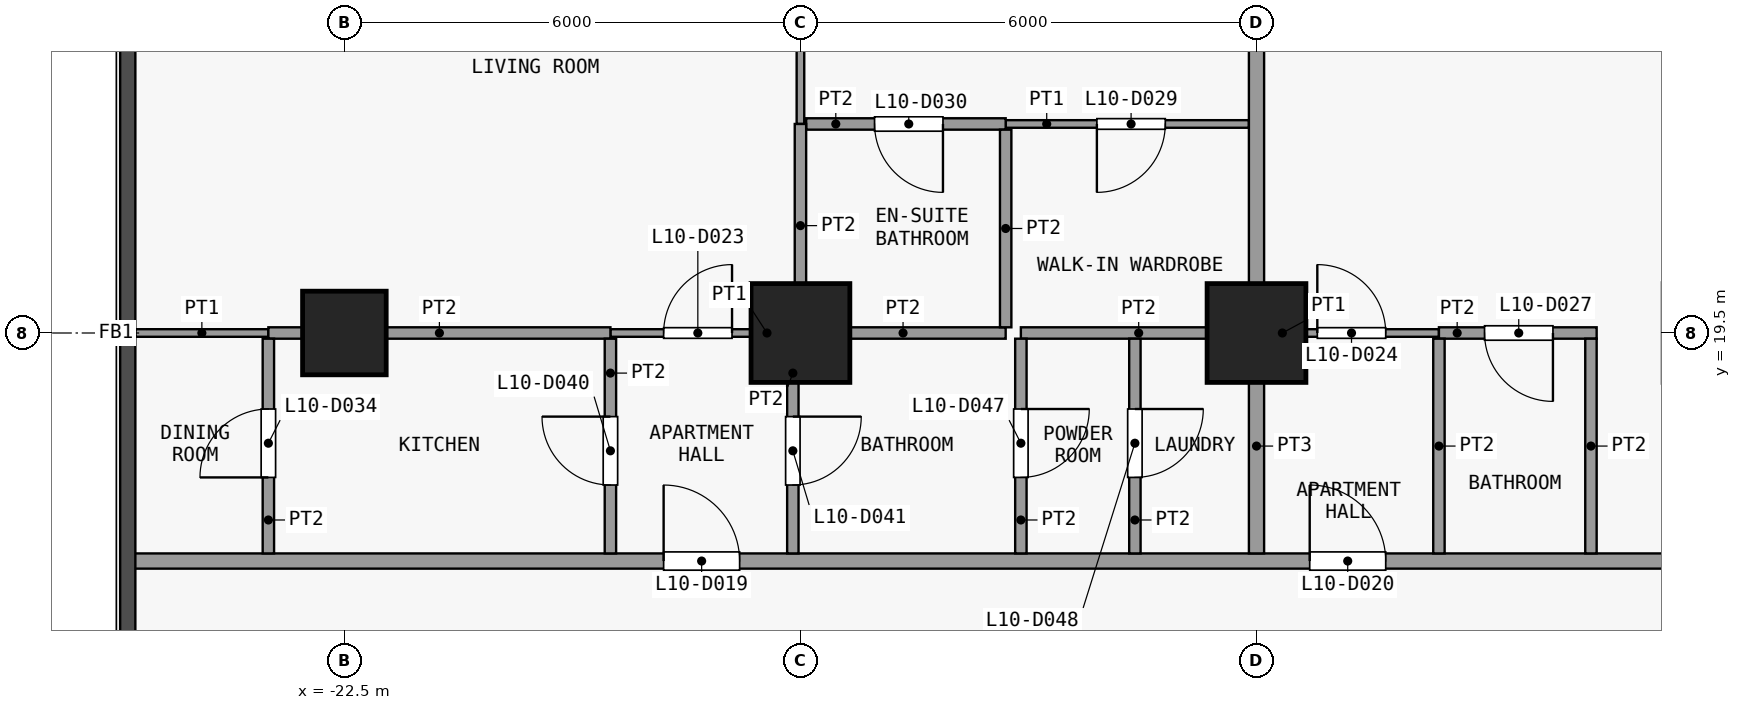
"""IFC4 building model, lengths in metres.
Left out: names, types, materials, properties, quantities, classifications, styles, units other than length and angle.
Written with IfcOpenShell. Run it as: python <this file> out.ifc"""

import sys

from ifc_helpers import new_model, si_unit, direction, frame, frame_2d, origin, origin_2d, place, context, subcontext, project, spatial, rectangle, extrude, element, fill, save


model = new_model("IFC4")
c1 = context("Model", 3, precision=1e-05, world=origin(), true_north=direction((0.0, 1.0)))
c2 = subcontext(c1, "Body", "Model", "MODEL_VIEW")
j1 = project(units=[si_unit("LENGTHUNIT", "METRE"), si_unit("PLANEANGLEUNIT", "RADIAN")], contexts=[c1])
p1 = place(None, origin())
s1 = spatial("IfcSite", under=j1, at=p1, CompositionType="ELEMENT")
p2 = place(p1, origin())
s2 = spatial("IfcBuilding", under=s1, at=p2, CompositionType="ELEMENT")
p3 = place(p2, frame((0.0, 0.0, 46.9)))
s3 = spatial("IfcBuildingStorey", under=s2, at=p3, CompositionType="ELEMENT", Elevation=46.9)
p4 = place(p3, frame((-22.5, 19.5, 0.0), z_axis=(0.0, 0.0, 1.0), x_axis=(1.0, 0.0, 0.0)))
e1 = element("IfcColumn", 1, at=p4, inside=s3, PredefinedType="COLUMN", context=c2, shape_type="SweptSolid", body=[
    extrude(rectangle(XDim=1.1, YDim=1.1, at=origin_2d()), origin(), (0.0, 0.0, 1.0), 3.6),
])
for number, where, z_axis, x_axis in (
    (2, (-16.5, 19.5, 0.0), (0.0, 0.0, 1.0), (1.0, 0.0, 0.0)),
    (3, (-10.5, 19.5, 0.0), (0.0, 0.0, 1.0), (1.0, 0.0, 0.0)),
):
    element("IfcColumn", number, at=place(p3, frame(where, z_axis=z_axis, x_axis=x_axis)), inside=s3, PredefinedType="COLUMN", context=c2, shape_type="SweptSolid", body=[
        extrude(rectangle(XDim=1.3, YDim=1.3, at=origin_2d()), origin(), (0.0, 0.0, 1.0), 3.6),
    ])
p5 = place(p3, frame((-25.35, 16.5, 0.0), z_axis=(0.0, 0.0, 1.0), x_axis=(1.0, 0.0, 0.0)))
e4 = element("IfcWall", 4, at=p5, inside=s3, PredefinedType="PARTITIONING", context=c2, shape_type="SweptSolid", body=[
    extrude(rectangle(XDim=50.7, YDim=0.2, at=frame_2d((25.35, 0.0))), origin(), (0.0, 0.0, 1.0), 3.3),
])
p6 = place(p5, frame((7.05, 0.0, 0.0)))
e5 = element("IfcOpeningElement", 5, at=p6, cuts=e4, PredefinedType="OPENING", context=c2, shape_type="SweptSolid", body=[
    extrude(rectangle(XDim=1.0, YDim=2.1, at=frame_2d((0.5, 1.05))), frame((0.0, 0.11, 0.0), z_axis=(0.0, -1.0, 0.0), x_axis=(1.0, 0.0, 0.0)), (0.0, 0.0, 1.0), 0.22),
])
p7 = place(p5, frame((15.55, 0.0, 0.0)))
e6 = element("IfcOpeningElement", 6, at=p7, cuts=e4, PredefinedType="OPENING", context=c2, shape_type="SweptSolid", body=[
    extrude(rectangle(XDim=1.0, YDim=2.1, at=frame_2d((0.5, 1.05))), frame((0.0, 0.11, 0.0), z_axis=(0.0, -1.0, 0.0), x_axis=(1.0, 0.0, 0.0)), (0.0, 0.0, 1.0), 0.22),
])
p8 = place(p5, frame((30.55, 0.0, 0.0)))
e7 = element("IfcOpeningElement", 7, at=p8, cuts=e4, PredefinedType="OPENING", context=c2, shape_type="SweptSolid", body=[
    extrude(rectangle(XDim=1.0, YDim=2.1, at=frame_2d((0.5, 1.05))), frame((0.0, 0.11, 0.0), z_axis=(0.0, -1.0, 0.0), x_axis=(1.0, 0.0, 0.0)), (0.0, 0.0, 1.0), 0.22),
])
p9 = place(p5, frame((45.05, 0.0, 0.0)))
e8 = element("IfcOpeningElement", 8, at=p9, cuts=e4, PredefinedType="OPENING", context=c2, shape_type="SweptSolid", body=[
    extrude(rectangle(XDim=1.0, YDim=2.1, at=frame_2d((0.5, 1.05))), frame((0.0, 0.11, 0.0), z_axis=(0.0, -1.0, 0.0), x_axis=(1.0, 0.0, 0.0)), (0.0, 0.0, 1.0), 0.22),
])
p10 = place(p3, frame((-25.25, 19.5, 0.0), z_axis=(0.0, 0.0, 1.0), x_axis=(1.0, 0.0, 0.0)))
e9 = element("IfcWall", 9, at=p10, inside=s3, PredefinedType="PARTITIONING", context=c2, shape_type="SweptSolid", body=[
    extrude(rectangle(XDim=1.75, YDim=0.1, at=frame_2d((0.875, 0.0))), origin(), (0.0, 0.0, 1.0), 3.3),
])
p11 = place(p3, frame((-19.0, 19.5, 0.0), z_axis=(0.0, 0.0, 1.0), x_axis=(1.0, 0.0, 0.0)))
e10 = element("IfcWall", 10, at=p11, inside=s3, PredefinedType="PARTITIONING", context=c2, shape_type="SweptSolid", body=[
    extrude(rectangle(XDim=2.4, YDim=0.1, at=frame_2d((1.2, 0.0))), origin(), (0.0, 0.0, 1.0), 3.3),
])
p12 = place(p11, frame((0.7, 0.0, 0.0)))
e11 = element("IfcOpeningElement", 11, at=p12, cuts=e10, PredefinedType="OPENING", context=c2, shape_type="SweptSolid", body=[
    extrude(rectangle(XDim=0.9, YDim=2.1, at=frame_2d((0.45, 1.05))), frame((0.0, 0.06, 0.0), z_axis=(0.0, -1.0, 0.0), x_axis=(1.0, 0.0, 0.0)), (0.0, 0.0, 1.0), 0.12),
])
p13 = place(p3, frame((-10.5, 19.5, 0.0), z_axis=(0.0, 0.0, 1.0), x_axis=(1.0, 0.0, 0.0)))
e12 = element("IfcWall", 12, at=p13, inside=s3, PredefinedType="PARTITIONING", context=c2, shape_type="SweptSolid", body=[
    extrude(rectangle(XDim=2.4, YDim=0.1, at=frame_2d((1.2, 0.0))), origin(), (0.0, 0.0, 1.0), 3.3),
])
p14 = place(p13, frame((0.8, 0.0, 0.0)))
e13 = element("IfcOpeningElement", 13, at=p14, cuts=e12, PredefinedType="OPENING", context=c2, shape_type="SweptSolid", body=[
    extrude(rectangle(XDim=0.9, YDim=2.1, at=frame_2d((0.45, 1.05))), frame((0.0, 0.06, 0.0), z_axis=(0.0, -1.0, 0.0), x_axis=(1.0, 0.0, 0.0)), (0.0, 0.0, 1.0), 0.12),
])
p15 = place(p3, frame((-23.5, 19.5, 0.0), z_axis=(0.0, 0.0, 1.0), x_axis=(1.0, 0.0, 0.0)))
e14 = element("IfcWall", 14, at=p15, inside=s3, PredefinedType="PARTITIONING", context=c2, shape_type="SweptSolid", body=[
    extrude(rectangle(XDim=4.5, YDim=0.15, at=frame_2d((2.25, 0.0))), origin(), (0.0, 0.0, 1.0), 3.3),
])
p16 = place(p3, frame((-16.5, 19.5, 0.0), z_axis=(0.0, 0.0, 1.0), x_axis=(1.0, 0.0, 0.0)))
e15 = element("IfcWall", 15, at=p16, inside=s3, PredefinedType="PARTITIONING", context=c2, shape_type="SweptSolid", body=[
    extrude(rectangle(XDim=2.7, YDim=0.15, at=frame_2d((1.35, 0.0))), origin(), (0.0, 0.0, 1.0), 3.3),
])
p17 = place(p3, frame((-13.6, 19.5, 0.0), z_axis=(0.0, 0.0, 1.0), x_axis=(1.0, 0.0, 0.0)))
e16 = element("IfcWall", 16, at=p17, inside=s3, PredefinedType="PARTITIONING", context=c2, shape_type="SweptSolid", body=[
    extrude(rectangle(XDim=3.1, YDim=0.15, at=frame_2d((1.55, 0.0))), origin(), (0.0, 0.0, 1.0), 3.3),
])
p18 = place(p3, frame((-8.1, 19.5, 0.0), z_axis=(0.0, 0.0, 1.0), x_axis=(1.0, 0.0, 0.0)))
e17 = element("IfcWall", 17, at=p18, inside=s3, PredefinedType="PARTITIONING", context=c2, shape_type="SweptSolid", body=[
    extrude(rectangle(XDim=2.075, YDim=0.15, at=frame_2d((1.038, 0.0))), origin(), (0.0, 0.0, 1.0), 3.3),
])
p19 = place(p18, frame((0.6, 0.0, 0.0)))
e18 = element("IfcOpeningElement", 18, at=p19, cuts=e17, PredefinedType="OPENING", context=c2, shape_type="SweptSolid", body=[
    extrude(rectangle(XDim=0.9, YDim=2.1, at=frame_2d((0.45, 1.05))), frame((0.0, 0.085, 0.0), z_axis=(0.0, -1.0, 0.0), x_axis=(1.0, 0.0, 0.0)), (0.0, 0.0, 1.0), 0.17),
])
p20 = place(p3, frame((-13.8, 22.25, 0.0), z_axis=(0.0, 0.0, 1.0), x_axis=(1.0, 0.0, 0.0)))
e19 = element("IfcWall", 19, at=p20, inside=s3, PredefinedType="PARTITIONING", context=c2, shape_type="SweptSolid", body=[
    extrude(rectangle(XDim=3.2, YDim=0.1, at=frame_2d((1.6, 0.0))), origin(), (0.0, 0.0, 1.0), 3.3),
])
p21 = place(p20, frame((1.2, 0.0, 0.0)))
e20 = element("IfcOpeningElement", 20, at=p21, cuts=e19, PredefinedType="OPENING", context=c2, shape_type="SweptSolid", body=[
    extrude(rectangle(XDim=0.9, YDim=2.1, at=frame_2d((0.45, 1.05))), frame((0.0, 0.06, 0.0), z_axis=(0.0, -1.0, 0.0), x_axis=(1.0, 0.0, 0.0)), (0.0, 0.0, 1.0), 0.12),
])
p22 = place(p3, frame((-16.425, 22.25, 0.0), z_axis=(0.0, 0.0, 1.0), x_axis=(1.0, 0.0, 0.0)))
e21 = element("IfcWall", 21, at=p22, inside=s3, PredefinedType="PARTITIONING", context=c2, shape_type="SweptSolid", body=[
    extrude(rectangle(XDim=2.625, YDim=0.15, at=frame_2d((1.312, 0.0))), origin(), (0.0, 0.0, 1.0), 3.3),
])
p23 = place(p22, frame((0.9, 0.0, 0.0)))
e22 = element("IfcOpeningElement", 22, at=p23, cuts=e21, PredefinedType="OPENING", context=c2, shape_type="SweptSolid", body=[
    extrude(rectangle(XDim=0.9, YDim=2.1, at=frame_2d((0.45, 1.05))), frame((0.0, 0.085, 0.0), z_axis=(0.0, -1.0, 0.0), x_axis=(1.0, 0.0, 0.0)), (0.0, 0.0, 1.0), 0.17),
])
p24 = place(p3, frame((-23.5, 16.6, 0.0), z_axis=(0.0, 0.0, 1.0), x_axis=(0.0, 1.0, 0.0)))
e23 = element("IfcWall", 23, at=p24, inside=s3, PredefinedType="PARTITIONING", context=c2, shape_type="SweptSolid", body=[
    extrude(rectangle(XDim=2.825, YDim=0.15, at=frame_2d((1.413, 0.0))), origin(), (0.0, 0.0, 1.0), 3.3),
])
p25 = place(p24, frame((1.0, 0.0, 0.0)))
e24 = element("IfcOpeningElement", 24, at=p25, cuts=e23, PredefinedType="OPENING", context=c2, shape_type="SweptSolid", body=[
    extrude(rectangle(XDim=0.9, YDim=2.1, at=frame_2d((0.45, 1.05))), frame((0.0, 0.085, 0.0), z_axis=(0.0, -1.0, 0.0), x_axis=(1.0, 0.0, 0.0)), (0.0, 0.0, 1.0), 0.17),
])
p26 = place(p3, frame((-19.0, 16.6, 0.0), z_axis=(0.0, 0.0, 1.0), x_axis=(0.0, 1.0, 0.0)))
e25 = element("IfcWall", 25, at=p26, inside=s3, PredefinedType="PARTITIONING", context=c2, shape_type="SweptSolid", body=[
    extrude(rectangle(XDim=2.825, YDim=0.15, at=frame_2d((1.413, 0.0))), origin(), (0.0, 0.0, 1.0), 3.3),
])
p27 = place(p26, frame((0.9, 0.0, 0.0)))
e26 = element("IfcOpeningElement", 26, at=p27, cuts=e25, PredefinedType="OPENING", context=c2, shape_type="SweptSolid", body=[
    extrude(rectangle(XDim=0.9, YDim=2.1, at=frame_2d((0.45, 1.05))), frame((0.0, 0.085, 0.0), z_axis=(0.0, -1.0, 0.0), x_axis=(1.0, 0.0, 0.0)), (0.0, 0.0, 1.0), 0.17),
])
p28 = place(p3, frame((-16.6, 16.6, 0.0), z_axis=(0.0, 0.0, 1.0), x_axis=(0.0, 1.0, 0.0)))
e27 = element("IfcWall", 27, at=p28, inside=s3, PredefinedType="PARTITIONING", context=c2, shape_type="SweptSolid", body=[
    extrude(rectangle(XDim=2.825, YDim=0.15, at=frame_2d((1.413, 0.0))), origin(), (0.0, 0.0, 1.0), 3.3),
])
p29 = place(p28, frame((0.9, 0.0, 0.0)))
e28 = element("IfcOpeningElement", 28, at=p29, cuts=e27, PredefinedType="OPENING", context=c2, shape_type="SweptSolid", body=[
    extrude(rectangle(XDim=0.9, YDim=2.1, at=frame_2d((0.45, 1.05))), frame((0.0, 0.085, 0.0), z_axis=(0.0, -1.0, 0.0), x_axis=(1.0, 0.0, 0.0)), (0.0, 0.0, 1.0), 0.17),
])
p30 = place(p3, frame((-16.5, 22.25, 0.0), z_axis=(0.0, 0.0, 1.0), x_axis=(0.0, 1.0, 0.0)))
e29 = element("IfcWall", 29, at=p30, inside=s3, PredefinedType="PARTITIONING", context=c2, shape_type="SweptSolid", body=[
    extrude(rectangle(XDim=6.0, YDim=0.1, at=frame_2d((3.0, 0.0))), origin(), (0.0, 0.0, 1.0), 3.3),
])
p31 = place(p30, frame((1.7, 0.0, 0.0)))
e30 = element("IfcOpeningElement", 30, at=p31, cuts=e29, PredefinedType="OPENING", context=c2, shape_type="SweptSolid", body=[
    extrude(rectangle(XDim=0.9, YDim=2.1, at=frame_2d((0.45, 1.05))), frame((0.0, 0.06, 0.0), z_axis=(0.0, -1.0, 0.0), x_axis=(1.0, 0.0, 0.0)), (0.0, 0.0, 1.0), 0.12),
])
p32 = place(p3, frame((-16.5, 19.575, 0.0), z_axis=(0.0, 0.0, 1.0), x_axis=(0.0, 1.0, 0.0)))
e31 = element("IfcWall", 31, at=p32, inside=s3, PredefinedType="PARTITIONING", context=c2, shape_type="SweptSolid", body=[
    extrude(rectangle(XDim=2.675, YDim=0.15, at=frame_2d((1.337, 0.0))), origin(), (0.0, 0.0, 1.0), 3.3),
])
p33 = place(p3, frame((-13.8, 19.575, 0.0), z_axis=(0.0, 0.0, 1.0), x_axis=(0.0, 1.0, 0.0)))
e32 = element("IfcWall", 32, at=p33, inside=s3, PredefinedType="PARTITIONING", context=c2, shape_type="SweptSolid", body=[
    extrude(rectangle(XDim=2.6, YDim=0.15, at=frame_2d((1.3, 0.0))), origin(), (0.0, 0.0, 1.0), 3.3),
])
p34 = place(p3, frame((-13.6, 16.6, 0.0), z_axis=(0.0, 0.0, 1.0), x_axis=(0.0, 1.0, 0.0)))
e33 = element("IfcWall", 33, at=p34, inside=s3, PredefinedType="PARTITIONING", context=c2, shape_type="SweptSolid", body=[
    extrude(rectangle(XDim=2.825, YDim=0.15, at=frame_2d((1.413, 0.0))), origin(), (0.0, 0.0, 1.0), 3.3),
])
p35 = place(p34, frame((1.0, 0.0, 0.0)))
e34 = element("IfcOpeningElement", 34, at=p35, cuts=e33, PredefinedType="OPENING", context=c2, shape_type="SweptSolid", body=[
    extrude(rectangle(XDim=0.9, YDim=2.1, at=frame_2d((0.45, 1.05))), frame((0.0, 0.085, 0.0), z_axis=(0.0, -1.0, 0.0), x_axis=(1.0, 0.0, 0.0)), (0.0, 0.0, 1.0), 0.17),
])
p36 = place(p3, frame((-12.1, 16.6, 0.0), z_axis=(0.0, 0.0, 1.0), x_axis=(0.0, 1.0, 0.0)))
e35 = element("IfcWall", 35, at=p36, inside=s3, PredefinedType="PARTITIONING", context=c2, shape_type="SweptSolid", body=[
    extrude(rectangle(XDim=2.825, YDim=0.15, at=frame_2d((1.413, 0.0))), origin(), (0.0, 0.0, 1.0), 3.3),
])
p37 = place(p36, frame((1.0, 0.0, 0.0)))
e36 = element("IfcOpeningElement", 36, at=p37, cuts=e35, PredefinedType="OPENING", context=c2, shape_type="SweptSolid", body=[
    extrude(rectangle(XDim=0.9, YDim=2.1, at=frame_2d((0.45, 1.05))), frame((0.0, 0.085, 0.0), z_axis=(0.0, -1.0, 0.0), x_axis=(1.0, 0.0, 0.0)), (0.0, 0.0, 1.0), 0.17),
])
p38 = place(p3, frame((-10.5, 16.6, 0.0), z_axis=(0.0, 0.0, 1.0), x_axis=(0.0, 1.0, 0.0)))
e37 = element("IfcWall", 37, at=p38, inside=s3, PredefinedType="PARTITIONING", context=c2, shape_type="SweptSolid", body=[
    extrude(rectangle(XDim=2.825, YDim=0.2, at=frame_2d((1.413, 0.0))), origin(), (0.0, 0.0, 1.0), 3.3),
])
p39 = place(p3, frame((-10.5, 19.575, 0.0), z_axis=(0.0, 0.0, 1.0), x_axis=(0.0, 1.0, 0.0)))
e38 = element("IfcWall", 38, at=p39, inside=s3, PredefinedType="PARTITIONING", context=c2, shape_type="SweptSolid", body=[
    extrude(rectangle(XDim=8.675, YDim=0.2, at=frame_2d((4.337, 0.0))), origin(), (0.0, 0.0, 1.0), 3.3),
])
for number, where, z_axis, x_axis in (
    (39, (-8.1, 16.6, 0.0), (0.0, 0.0, 1.0), (0.0, 1.0, 0.0)),
    (40, (-6.1, 16.6, 0.0), (0.0, 0.0, 1.0), (0.0, 1.0, 0.0)),
):
    element("IfcWall", number, at=place(p3, frame(where, z_axis=z_axis, x_axis=x_axis)), inside=s3, PredefinedType="PARTITIONING", context=c2, shape_type="SweptSolid", body=[
        extrude(rectangle(XDim=2.825, YDim=0.15, at=frame_2d((1.413, 0.0))), origin(), (0.0, 0.0, 1.0), 3.3),
    ])
p40 = place(p6, origin())
e41 = element("IfcDoor", 41, at=p40, inside=s3, OperationType="SINGLE_SWING_RIGHT", PredefinedType="DOOR", context=c2, shape_type="SweptSolid", body=[
    extrude(rectangle(XDim=1.0, YDim=2.1, at=frame_2d((0.5, 1.05))), frame((0.0, 0.025, 0.0), z_axis=(0.0, -1.0, 0.0), x_axis=(1.0, 0.0, 0.0)), (0.0, 0.0, 1.0), 0.05),
])
fill(e5, e41)
p41 = place(p7, origin())
e42 = element("IfcDoor", 42, at=p41, inside=s3, OperationType="SINGLE_SWING_RIGHT", PredefinedType="DOOR", context=c2, shape_type="SweptSolid", body=[
    extrude(rectangle(XDim=1.0, YDim=2.1, at=frame_2d((0.5, 1.05))), frame((0.0, 0.025, 0.0), z_axis=(0.0, -1.0, 0.0), x_axis=(1.0, 0.0, 0.0)), (0.0, 0.0, 1.0), 0.05),
])
fill(e6, e42)
p42 = place(p12, origin())
e43 = element("IfcDoor", 43, at=p42, inside=s3, OperationType="SINGLE_SWING_LEFT", PredefinedType="DOOR", context=c2, shape_type="SweptSolid", body=[
    extrude(rectangle(XDim=0.9, YDim=2.1, at=frame_2d((0.45, 1.05))), frame((0.0, 0.025, 0.0), z_axis=(0.0, -1.0, 0.0), x_axis=(1.0, 0.0, 0.0)), (0.0, 0.0, 1.0), 0.05),
])
fill(e11, e43)
p43 = place(p14, origin())
e44 = element("IfcDoor", 44, at=p43, inside=s3, OperationType="SINGLE_SWING_RIGHT", PredefinedType="DOOR", context=c2, shape_type="SweptSolid", body=[
    extrude(rectangle(XDim=0.9, YDim=2.1, at=frame_2d((0.45, 1.05))), frame((0.0, 0.025, 0.0), z_axis=(0.0, -1.0, 0.0), x_axis=(1.0, 0.0, 0.0)), (0.0, 0.0, 1.0), 0.05),
])
fill(e13, e44)
p44 = place(p19, origin())
e45 = element("IfcDoor", 45, at=p44, inside=s3, OperationType="SINGLE_SWING_RIGHT", PredefinedType="DOOR", context=c2, shape_type="SweptSolid", body=[
    extrude(rectangle(XDim=0.9, YDim=2.1, at=frame_2d((0.45, 1.05))), frame((0.0, 0.025, 0.0), z_axis=(0.0, -1.0, 0.0), x_axis=(1.0, 0.0, 0.0)), (0.0, 0.0, 1.0), 0.05),
])
fill(e18, e45)
p45 = place(p21, origin())
e46 = element("IfcDoor", 46, at=p45, inside=s3, OperationType="SINGLE_SWING_LEFT", PredefinedType="DOOR", context=c2, shape_type="SweptSolid", body=[
    extrude(rectangle(XDim=0.9, YDim=2.1, at=frame_2d((0.45, 1.05))), frame((0.0, 0.025, 0.0), z_axis=(0.0, -1.0, 0.0), x_axis=(1.0, 0.0, 0.0)), (0.0, 0.0, 1.0), 0.05),
])
fill(e20, e46)
p46 = place(p23, origin())
e47 = element("IfcDoor", 47, at=p46, inside=s3, OperationType="SINGLE_SWING_RIGHT", PredefinedType="DOOR", context=c2, shape_type="SweptSolid", body=[
    extrude(rectangle(XDim=0.9, YDim=2.1, at=frame_2d((0.45, 1.05))), frame((0.0, 0.025, 0.0), z_axis=(0.0, -1.0, 0.0), x_axis=(1.0, 0.0, 0.0)), (0.0, 0.0, 1.0), 0.05),
])
fill(e22, e47)
p47 = place(p25, origin())
e48 = element("IfcDoor", 48, at=p47, inside=s3, OperationType="SINGLE_SWING_RIGHT", PredefinedType="DOOR", context=c2, shape_type="SweptSolid", body=[
    extrude(rectangle(XDim=0.9, YDim=2.1, at=frame_2d((0.45, 1.05))), frame((0.0, 0.025, 0.0), z_axis=(0.0, -1.0, 0.0), x_axis=(1.0, 0.0, 0.0)), (0.0, 0.0, 1.0), 0.05),
])
fill(e24, e48)
p48 = place(p27, origin())
e49 = element("IfcDoor", 49, at=p48, inside=s3, OperationType="SINGLE_SWING_LEFT", PredefinedType="DOOR", context=c2, shape_type="SweptSolid", body=[
    extrude(rectangle(XDim=0.9, YDim=2.1, at=frame_2d((0.45, 1.05))), frame((0.0, 0.025, 0.0), z_axis=(0.0, -1.0, 0.0), x_axis=(1.0, 0.0, 0.0)), (0.0, 0.0, 1.0), 0.05),
])
fill(e26, e49)
p49 = place(p29, origin())
e50 = element("IfcDoor", 50, at=p49, inside=s3, OperationType="SINGLE_SWING_RIGHT", PredefinedType="DOOR", context=c2, shape_type="SweptSolid", body=[
    extrude(rectangle(XDim=0.9, YDim=2.1, at=frame_2d((0.45, 1.05))), frame((0.0, 0.025, 0.0), z_axis=(0.0, -1.0, 0.0), x_axis=(1.0, 0.0, 0.0)), (0.0, 0.0, 1.0), 0.05),
])
fill(e28, e50)
p50 = place(p35, origin())
e51 = element("IfcDoor", 51, at=p50, inside=s3, OperationType="SINGLE_SWING_RIGHT", PredefinedType="DOOR", context=c2, shape_type="SweptSolid", body=[
    extrude(rectangle(XDim=0.9, YDim=2.1, at=frame_2d((0.45, 1.05))), frame((0.0, 0.025, 0.0), z_axis=(0.0, -1.0, 0.0), x_axis=(1.0, 0.0, 0.0)), (0.0, 0.0, 1.0), 0.05),
])
fill(e34, e51)
p51 = place(p37, origin())
e52 = element("IfcDoor", 52, at=p51, inside=s3, OperationType="SINGLE_SWING_RIGHT", PredefinedType="DOOR", context=c2, shape_type="SweptSolid", body=[
    extrude(rectangle(XDim=0.9, YDim=2.1, at=frame_2d((0.45, 1.05))), frame((0.0, 0.025, 0.0), z_axis=(0.0, -1.0, 0.0), x_axis=(1.0, 0.0, 0.0)), (0.0, 0.0, 1.0), 0.05),
])
fill(e36, e52)
save(model, sys.argv[1])
